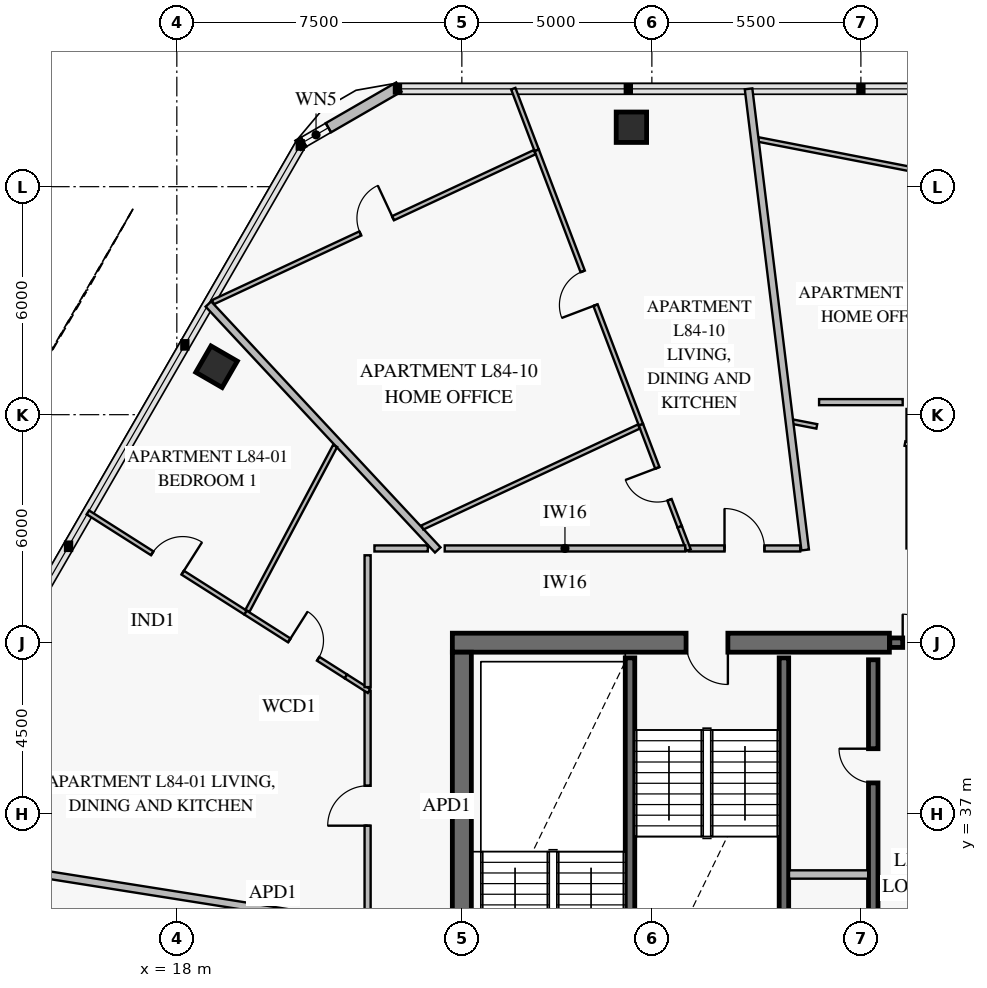
"""IFC4 building model, lengths in metres.
Left out: names, types, materials, properties, quantities, classifications, styles, units other than length and angle.
Written with IfcOpenShell. Run it as: python <this file> out.ifc"""

import sys

from ifc_helpers import new_model, si_unit, direction, frame, frame_2d, origin, origin_2d, place, context, subcontext, project, spatial, rectangle, extrude, element, fill, save


model = new_model("IFC4")
c1 = context("Model", 3, precision=1e-05, world=origin(), true_north=direction((0.0, 1.0)))
c2 = subcontext(c1, "Body", "Model", "MODEL_VIEW")
j1 = project(units=[si_unit("LENGTHUNIT", "METRE"), si_unit("PLANEANGLEUNIT", "RADIAN")], contexts=[c1])
p1 = place(None, origin())
s1 = spatial("IfcSite", under=j1, at=p1, CompositionType="ELEMENT")
p2 = place(p1, origin())
s2 = spatial("IfcBuilding", under=s1, at=p2, CompositionType="ELEMENT")
p3 = place(p2, frame((0.0, 0.0, 331.0)))
s3 = spatial("IfcBuildingStorey", under=s2, at=p3, CompositionType="ELEMENT", Elevation=331.0)
p4 = place(p3, frame((36.75, 41.5, 0.0), z_axis=(0.0, 0.0, 1.0), x_axis=(-1.0, 0.0, 0.0)))
e1 = element("IfcWall", 1, at=p4, inside=s3, PredefinedType="SHEAR", context=c2, shape_type="SweptSolid", body=[
    extrude(rectangle(XDim=11.5, YDim=0.5, at=frame_2d((5.75, 0.0))), origin(), (0.0, 0.0, 1.0), 3.8),
])
p5 = place(p4, frame((4.25, 0.0, 0.0)))
e2 = element("IfcOpeningElement", 2, at=p5, cuts=e1, PredefinedType="OPENING", context=c2, shape_type="SweptSolid", body=[
    extrude(rectangle(XDim=1.1, YDim=2.15, at=frame_2d((0.55, 1.075))), frame((0.0, 0.262, 0.0), z_axis=(0.0, -1.0, 0.0), x_axis=(1.0, 0.0, 0.0)), (0.0, 0.0, 1.0), 0.524),
])
p6 = place(p3, frame((25.5, 22.75, 0.0), z_axis=(0.0, 0.0, 1.0), x_axis=(0.0, 1.0, 0.0)))
e3 = element("IfcWall", 3, at=p6, inside=s3, PredefinedType="SHEAR", context=c2, shape_type="SweptSolid", body=[
    extrude(rectangle(XDim=18.5, YDim=0.5, at=frame_2d((9.25, 0.0))), origin(), (0.0, 0.0, 1.0), 3.8),
])
p7 = place(p6, frame((9.0, 0.0, 0.0)))
e4 = element("IfcOpeningElement", 4, at=p7, cuts=e3, PredefinedType="OPENING", context=c2, shape_type="SweptSolid", body=[
    extrude(rectangle(XDim=1.1, YDim=2.15, at=frame_2d((0.55, 1.075))), frame((0.0, 0.262, 0.0), z_axis=(0.0, -1.0, 0.0), x_axis=(1.0, 0.0, 0.0)), (0.0, 0.0, 1.0), 0.524),
])
for number, where, z_axis, x_axis in (
    (5, (29.961, 55.064, 0.0), (0.0, 0.0, 1.0), (-1.0, 0.0, 0.0)),
    (6, (19.045, 48.762, 0.0), (0.0, 0.0, 1.0), (-0.5, -0.866, 0.0)),
):
    element("IfcColumn", number, at=place(p3, frame(where, z_axis=z_axis, x_axis=x_axis)), inside=s3, PredefinedType="COLUMN", context=c2, shape_type="SweptSolid", body=[
        extrude(rectangle(XDim=0.8, YDim=0.8, at=origin_2d()), origin(), (0.0, 0.0, 1.0), 3.55),
    ])
p8 = place(p3, frame((21.189, 54.589, 0.0), z_axis=(0.0, 0.0, 1.0), x_axis=(0.866023752521, 0.50000286006, 0.0)))
e7 = element("IfcWall", 7, at=p8, inside=s3, PredefinedType="SOLIDWALL", context=c2, shape_type="SweptSolid", body=[
    extrude(rectangle(XDim=3.065, YDim=0.28, at=frame_2d((1.532, 0.0))), origin(), (0.0, 0.0, 1.0), 3.55),
])
p9 = place(p8, frame((0.173, 0.0, 0.85)))
e8 = element("IfcOpeningElement", 8, at=p9, cuts=e7, PredefinedType="OPENING", context=c2, shape_type="SweptSolid", body=[
    extrude(rectangle(XDim=0.75, YDim=1.5, at=frame_2d((0.375, 0.75))), frame((0.0, 0.152, 0.0), z_axis=(0.0, -1.0, 0.0), x_axis=(1.0, 0.0, 0.0)), (0.0, 0.0, 1.0), 0.304),
])
p10 = place(p3, frame((36.76, 41.5, 0.0), z_axis=(0.0, 0.0, 1.0), x_axis=(1.0, 0.0, 0.0)))
e9 = element("IfcWall", 9, at=p10, inside=s3, PredefinedType="SOLIDWALL", context=c2, shape_type="SweptSolid", body=[
    extrude(rectangle(XDim=2.18, YDim=0.25, at=frame_2d((1.09, 0.0))), origin(), (0.0, 0.0, 1.0), 3.8),
])
p11 = place(p10, frame((0.34, 0.0, 0.0)))
e10 = element("IfcOpeningElement", 10, at=p11, cuts=e9, PredefinedType="OPENING", context=c2, shape_type="SweptSolid", body=[
    extrude(rectangle(XDim=1.5, YDim=2.15, at=frame_2d((0.75, 1.075))), frame((0.0, 0.137, 0.0), z_axis=(0.0, -1.0, 0.0), x_axis=(1.0, 0.0, 0.0)), (0.0, 0.0, 1.0), 0.274),
])
for number, where, z_axis, x_axis in (
    (11, (29.925, 31.4, 0.0), (0.0, 0.0, 1.0), (0.0, 1.0, 0.0)),
    (12, (33.975, 31.4, 0.0), (0.0, 0.0, 1.0), (0.0, 1.0, 0.0)),
):
    element("IfcWall", number, at=place(p3, frame(where, z_axis=z_axis, x_axis=x_axis)), inside=s3, PredefinedType="SOLIDWALL", context=c2, shape_type="SweptSolid", body=[
        extrude(rectangle(XDim=9.7, YDim=0.25, at=frame_2d((4.85, 0.0))), origin(), (0.0, 0.0, 1.0), 3.8),
    ])
p12 = place(p3, frame((36.325, 31.4, 0.0), z_axis=(0.0, 0.0, 1.0), x_axis=(0.0, 1.0, 0.0)))
e13 = element("IfcWall", 13, at=p12, inside=s3, PredefinedType="SOLIDWALL", context=c2, shape_type="SweptSolid", body=[
    extrude(rectangle(XDim=9.65, YDim=0.25, at=frame_2d((4.825, 0.0))), origin(), (0.0, 0.0, 1.0), 3.8),
])
p13 = place(p12, frame((1.49, 0.0, 0.0)))
e14 = element("IfcOpeningElement", 14, at=p13, cuts=e13, PredefinedType="OPENING", context=c2, shape_type="SweptSolid", body=[
    extrude(rectangle(XDim=0.9, YDim=2.1, at=frame_2d((0.45, 1.05))), frame((0.0, 0.137, 0.0), z_axis=(0.0, -1.0, 0.0), x_axis=(1.0, 0.0, 0.0)), (0.0, 0.0, 1.0), 0.274),
])
p14 = place(p12, frame((6.41, 0.0, 0.0)))
e15 = element("IfcOpeningElement", 15, at=p14, cuts=e13, PredefinedType="OPENING", context=c2, shape_type="SweptSolid", body=[
    extrude(rectangle(XDim=0.9, YDim=2.1, at=frame_2d((0.45, 1.05))), frame((0.0, 0.137, 0.0), z_axis=(0.0, -1.0, 0.0), x_axis=(1.0, 0.0, 0.0)), (0.0, 0.0, 1.0), 0.274),
])
p15 = place(p3, frame((22.45, 40.612, 0.0), z_axis=(0.0, 0.0, 1.0), x_axis=(-0.843946894376, 0.536426732624, 0.0)))
e16 = element("IfcWall", 16, at=p15, inside=s3, PredefinedType="PARTITIONING", context=c2, shape_type="SweptSolid", body=[
    extrude(rectangle(XDim=3.134, YDim=0.12, at=frame_2d((1.567, 0.0))), origin(), (0.0, 0.0, 1.0), 3.2),
])
p16 = place(p15, frame((0.866, 0.0, 0.0)))
e17 = element("IfcOpeningElement", 17, at=p16, cuts=e16, PredefinedType="OPENING", context=c2, shape_type="SweptSolid", body=[
    extrude(rectangle(XDim=0.9, YDim=2.1, at=frame_2d((0.45, 1.05))), frame((0.0, 0.072, 0.0), z_axis=(0.0, -1.0, 0.0), x_axis=(1.0, 0.0, 0.0)), (0.0, 0.0, 1.0), 0.144),
])
p17 = place(p3, frame((19.805, 42.293, 0.0), z_axis=(0.0, 0.0, 1.0), x_axis=(-0.843964252014, 0.536399423306, 0.0)))
e18 = element("IfcWall", 18, at=p17, inside=s3, PredefinedType="PARTITIONING", context=c2, shape_type="SweptSolid", body=[
    extrude(rectangle(XDim=4.912, YDim=0.12, at=frame_2d((2.456, 0.0))), origin(), (0.0, 0.0, 1.0), 2.97),
])
p18 = place(p17, frame((1.956, 0.0, 0.0)))
e19 = element("IfcOpeningElement", 19, at=p18, cuts=e18, PredefinedType="OPENING", context=c2, shape_type="SweptSolid", body=[
    extrude(rectangle(XDim=0.95, YDim=2.1, at=frame_2d((0.475, 1.05))), frame((0.0, 0.072, 0.0), z_axis=(0.0, -1.0, 0.0), x_axis=(1.0, 0.0, 0.0)), (0.0, 0.0, 1.0), 0.144),
])
p19 = place(p3, frame((23.02, 40.226, 0.0), z_axis=(0.0, 0.0, 1.0), x_axis=(0.0, -1.0, 0.0)))
e20 = element("IfcWall", 20, at=p19, inside=s3, PredefinedType="PARTITIONING", context=c2, shape_type="SweptSolid", body=[
    extrude(rectangle(XDim=6.034, YDim=0.16, at=frame_2d((3.017, 0.0))), origin(), (0.0, 0.0, 1.0), 3.0),
])
p20 = place(p19, frame((2.492, 0.0, 0.0)))
e21 = element("IfcOpeningElement", 21, at=p20, cuts=e20, PredefinedType="OPENING", context=c2, shape_type="SweptSolid", body=[
    extrude(rectangle(XDim=1.05, YDim=2.15, at=frame_2d((0.525, 1.075))), frame((0.0, 0.092, 0.0), z_axis=(0.0, -1.0, 0.0), x_axis=(1.0, 0.0, 0.0)), (0.0, 0.0, 1.0), 0.184),
])
p21 = place(p3, frame((41.667, 53.115, 0.0), z_axis=(0.0, 0.0, 1.0), x_axis=(-0.981630458745, 0.190792144662, 0.0)))
e22 = element("IfcWall", 22, at=p21, inside=s3, PredefinedType="PARTITIONING", context=c2, shape_type="SweptSolid", body=[
    extrude(rectangle(XDim=8.515, YDim=0.12, at=frame_2d((4.257, 0.0))), origin(), (0.0, 0.0, 1.0), 3.0),
])
p22 = place(p21, frame((2.598, 0.0, 0.0)))
e23 = element("IfcOpeningElement", 23, at=p22, cuts=e22, PredefinedType="OPENING", context=c2, shape_type="SweptSolid", body=[
    extrude(rectangle(XDim=0.95, YDim=2.1, at=frame_2d((0.475, 1.05))), frame((0.0, 0.072, 0.0), z_axis=(0.0, -1.0, 0.0), x_axis=(1.0, 0.0, 0.0)), (0.0, 0.0, 1.0), 0.144),
])
p23 = place(p3, frame((31.233, 44.55, 0.0), z_axis=(0.0, 0.0, 1.0), x_axis=(-0.355127317652, 0.934817943911, 0.0)))
e24 = element("IfcWall", 24, at=p23, inside=s3, PredefinedType="PARTITIONING", context=c2, shape_type="SweptSolid", body=[
    extrude(rectangle(XDim=2.878, YDim=0.12, at=frame_2d((1.439, 0.0))), origin(), (0.0, 0.0, 1.0), 3.55),
])
p24 = place(p23, frame((0.759, 0.0, 0.0)))
e25 = element("IfcOpeningElement", 25, at=p24, cuts=e24, PredefinedType="OPENING", context=c2, shape_type="SweptSolid", body=[
    extrude(rectangle(XDim=0.9, YDim=2.1, at=frame_2d((0.45, 1.05))), frame((0.0, 0.072, 0.0), z_axis=(0.0, -1.0, 0.0), x_axis=(1.0, 0.0, 0.0)), (0.0, 0.0, 1.0), 0.144),
])
p25 = place(p3, frame((30.211, 47.24, 0.0), z_axis=(0.0, 0.0, 1.0), x_axis=(-0.355107814632, 0.934825352666, 0.0)))
e26 = element("IfcWall", 26, at=p25, inside=s3, PredefinedType="PARTITIONING", context=c2, shape_type="SweptSolid", body=[
    extrude(rectangle(XDim=7.723, YDim=0.12, at=frame_2d((3.861, 0.0))), origin(), (0.0, 0.0, 1.0), 2.97),
])
p26 = place(p25, frame((3.361, 0.0, 0.0)))
e27 = element("IfcOpeningElement", 27, at=p26, cuts=e26, PredefinedType="OPENING", context=c2, shape_type="SweptSolid", body=[
    extrude(rectangle(XDim=0.95, YDim=2.1, at=frame_2d((0.475, 1.05))), frame((0.0, 0.072, 0.0), z_axis=(0.0, -1.0, 0.0), x_axis=(1.0, 0.0, 0.0)), (0.0, 0.0, 1.0), 0.144),
])
p27 = place(p3, frame((27.415, 54.408, 0.0), z_axis=(0.0, 0.0, 1.0), x_axis=(-0.906299284586, -0.422636494825, 0.0)))
e28 = element("IfcWall", 28, at=p27, inside=s3, PredefinedType="PARTITIONING", context=c2, shape_type="SweptSolid", body=[
    extrude(rectangle(XDim=9.341, YDim=0.12, at=frame_2d((4.671, 0.0))), origin(), (0.0, 0.0, 1.0), 3.55),
])
p28 = place(p27, frame((4.112, 0.0, 0.0)))
e29 = element("IfcOpeningElement", 29, at=p28, cuts=e28, PredefinedType="OPENING", context=c2, shape_type="SweptSolid", body=[
    extrude(rectangle(XDim=0.95, YDim=2.1, at=frame_2d((0.475, 1.05))), frame((0.0, 0.072, 0.0), z_axis=(0.0, -1.0, 0.0), x_axis=(1.0, 0.0, 0.0)), (0.0, 0.0, 1.0), 0.144),
])
p29 = place(p3, frame((34.403, 43.98, 0.0), z_axis=(0.0, 0.0, 1.0), x_axis=(-1.0, 0.0, 0.0)))
e30 = element("IfcWall", 30, at=p29, inside=s3, PredefinedType="PARTITIONING", context=c2, shape_type="SweptSolid", body=[
    extrude(rectangle(XDim=2.932, YDim=0.16, at=frame_2d((1.466, 0.0))), origin(), (0.0, 0.0, 1.0), 3.0),
])
p30 = place(p29, frame((0.941, 0.0, 0.0)))
e31 = element("IfcOpeningElement", 31, at=p30, cuts=e30, PredefinedType="OPENING", context=c2, shape_type="SweptSolid", body=[
    extrude(rectangle(XDim=1.05, YDim=2.15, at=frame_2d((0.525, 1.075))), frame((0.0, 0.092, 0.0), z_axis=(0.0, -1.0, 0.0), x_axis=(1.0, 0.0, 0.0)), (0.0, 0.0, 1.0), 0.184),
])
p31 = place(p3, frame((34.108, 35.4, 0.0), z_axis=(0.0, 0.0, 1.0), x_axis=(1.0, 0.0, 0.0)))
e32 = element("IfcWall", 32, at=p31, inside=s3, PredefinedType="PARTITIONING", context=c2, shape_type="SweptSolid", body=[
    extrude(rectangle(XDim=2.084, YDim=0.22, at=frame_2d((1.042, 0.0))), origin(), (0.0, 0.0, 1.0), 3.55),
])
p32 = place(p3, frame((24.866, 43.94, 0.0), z_axis=(0.0, 0.0, 1.0), x_axis=(-0.68199474611, 0.731357071667, 0.0)))
e33 = element("IfcWall", 33, at=p32, inside=s3, PredefinedType="PARTITIONING", context=c2, shape_type="SweptSolid", body=[
    extrude(rectangle(XDim=8.848, YDim=0.2, at=frame_2d((4.424, 0.0))), origin(), (0.0, 0.0, 1.0), 2.97),
])
p33 = place(p3, frame((23.057, 40.226, 0.0), z_axis=(0.0, 0.0, 1.0), x_axis=(-0.844010519213, 0.536326620127, 0.0)))
e34 = element("IfcWall", 34, at=p33, inside=s3, PredefinedType="PARTITIONING", context=c2, shape_type="SweptSolid", body=[
    extrude(rectangle(XDim=0.72, YDim=0.12, at=frame_2d((0.36, 0.0))), origin(), (0.0, 0.0, 1.0), 3.55),
])
p34 = place(p3, frame((22.165, 46.678, 0.0), z_axis=(0.0, 0.0, 1.0), x_axis=(-0.469514895951, -0.882924550842, 0.0)))
e35 = element("IfcWall", 35, at=p34, inside=s3, PredefinedType="PARTITIONING", context=c2, shape_type="SweptSolid", body=[
    extrude(rectangle(XDim=4.913, YDim=0.12, at=frame_2d((2.457, 0.0))), origin(), (0.0, 0.0, 1.0), 3.0),
])
p35 = place(p3, frame((23.06, 34.05, 0.0), z_axis=(0.0, 0.0, 1.0), x_axis=(-0.987689201377, 0.156429030179, 0.0)))
e36 = element("IfcWall", 36, at=p35, inside=s3, PredefinedType="PARTITIONING", context=c2, shape_type="SweptSolid", body=[
    extrude(rectangle(XDim=12.686, YDim=0.2, at=frame_2d((6.343, 0.0))), origin(), (0.0, 0.0, 1.0), 2.97),
])
p36 = place(p3, frame((39.795, 46.229, 0.0), z_axis=(0.0, 0.0, 1.0), x_axis=(-0.981632896255, 0.190779603181, 0.0)))
e37 = element("IfcWall", 37, at=p36, inside=s3, PredefinedType="PARTITIONING", context=c2, shape_type="SweptSolid", body=[
    extrude(rectangle(XDim=2.685, YDim=0.12, at=frame_2d((1.342, 0.0))), origin(), (0.0, 0.0, 1.0), 3.0),
])
p37 = place(p3, frame((34.84, 47.192, 0.0), z_axis=(0.0, 0.0, 1.0), x_axis=(-0.981613573496, 0.190878999183, 0.0)))
e38 = element("IfcWall", 38, at=p37, inside=s3, PredefinedType="PARTITIONING", context=c2, shape_type="SweptSolid", body=[
    extrude(rectangle(XDim=0.7, YDim=0.12, at=frame_2d((0.35, 0.0))), origin(), (0.0, 0.0, 1.0), 3.55),
])
p38 = place(p3, frame((34.534, 43.94, 0.0), z_axis=(0.0, 0.0, 1.0), x_axis=(-0.121856786941, 0.992547693301, 0.0)))
e39 = element("IfcWall", 39, at=p38, inside=s3, PredefinedType="PARTITIONING", context=c2, shape_type="SweptSolid", body=[
    extrude(rectangle(XDim=12.225, YDim=0.2, at=frame_2d((6.113, 0.0))), origin(), (0.0, 0.0, 1.0), 2.97),
])
p39 = place(p3, frame((31.466, 43.937, 0.0), z_axis=(0.0, 0.0, 1.0), x_axis=(-0.355237262968, 0.934776169465, 0.0)))
e40 = element("IfcWall", 40, at=p39, inside=s3, PredefinedType="PARTITIONING", context=c2, shape_type="SweptSolid", body=[
    extrude(rectangle(XDim=0.656, YDim=0.12, at=frame_2d((0.328, 0.0))), origin(), (0.0, 0.0, 1.0), 3.55),
])
p40 = place(p3, frame((27.468, 54.46, 0.0), z_axis=(0.0, 0.0, 1.0), x_axis=(-0.35502809258, 0.934855632426, 0.0)))
e41 = element("IfcWall", 41, at=p40, inside=s3, PredefinedType="PARTITIONING", context=c2, shape_type="SweptSolid", body=[
    extrude(rectangle(XDim=1.732, YDim=0.12, at=frame_2d((0.866, 0.0))), origin(), (0.0, 0.0, 1.0), 3.55),
])
p41 = place(p3, frame((30.158, 47.188, 0.0), z_axis=(0.0, 0.0, 1.0), x_axis=(-0.906327969047, -0.422574978582, 0.0)))
e42 = element("IfcWall", 42, at=p41, inside=s3, PredefinedType="PARTITIONING", context=c2, shape_type="SweptSolid", body=[
    extrude(rectangle(XDim=6.285, YDim=0.12, at=frame_2d((3.143, 0.0))), origin(), (0.0, 0.0, 1.0), 3.55),
])
p42 = place(p3, frame((23.02, 43.8, 0.0), z_axis=(0.0, 0.0, 1.0), x_axis=(0.0, -1.0, 0.0)))
e43 = element("IfcWall", 43, at=p42, inside=s3, PredefinedType="PARTITIONING", context=c2, shape_type="SweptSolid", body=[
    extrude(rectangle(XDim=3.469, YDim=0.16, at=frame_2d((1.735, 0.0))), origin(), (0.0, 0.0, 1.0), 3.55),
])
p43 = place(p3, frame((24.604, 43.98, 0.0), z_axis=(0.0, 0.0, 1.0), x_axis=(-1.0, 0.0, 0.0)))
e44 = element("IfcWall", 44, at=p43, inside=s3, PredefinedType="PARTITIONING", context=c2, shape_type="SweptSolid", body=[
    extrude(rectangle(XDim=1.404, YDim=0.16, at=frame_2d((0.702, 0.0))), origin(), (0.0, 0.0, 1.0), 3.0),
])
p44 = place(p3, frame((37.1, 47.83, 0.0), z_axis=(0.0, 0.0, 1.0), x_axis=(-1.0, 0.0, 0.0)))
e45 = element("IfcWall", 45, at=p44, inside=s3, PredefinedType="PARTITIONING", context=c2, shape_type="SweptSolid", body=[
    extrude(rectangle(XDim=2.2, YDim=0.16, at=frame_2d((1.1, 0.0))), origin(), (0.0, 0.0, 1.0), 3.55),
])
p45 = place(p3, frame((31.376, 43.98, 0.0), z_axis=(0.0, 0.0, 1.0), x_axis=(-1.0, 0.0, 0.0)))
e46 = element("IfcWall", 46, at=p45, inside=s3, PredefinedType="PARTITIONING", context=c2, shape_type="SweptSolid", body=[
    extrude(rectangle(XDim=6.327, YDim=0.16, at=frame_2d((3.164, 0.0))), origin(), (0.0, 0.0, 1.0), 3.55),
])
p46 = place(p9, origin())
e47 = element("IfcWindow", 47, at=p46, inside=s3, PartitioningType="SINGLE_PANEL", PredefinedType="WINDOW", context=c2, shape_type="SweptSolid", body=[
    extrude(rectangle(XDim=0.75, YDim=1.5, at=frame_2d((0.375, 0.75))), frame((0.0, 0.03, 0.0), z_axis=(0.0, -1.0, 0.0), x_axis=(1.0, 0.0, 0.0)), (0.0, 0.0, 1.0), 0.06),
])
fill(e8, e47)
p47 = place(p5, origin())
e48 = element("IfcDoor", 48, at=p47, inside=s3, OperationType="SINGLE_SWING_LEFT", PredefinedType="USERDEFINED", context=c2, shape_type="SweptSolid", body=[
    extrude(rectangle(XDim=1.1, YDim=2.15, at=frame_2d((0.55, 1.075))), frame((0.0, 0.025, 0.0), z_axis=(0.0, -1.0, 0.0), x_axis=(1.0, 0.0, 0.0)), (0.0, 0.0, 1.0), 0.05),
])
fill(e2, e48)
p48 = place(p11, origin())
e49 = element("IfcDoor", 49, at=p48, inside=s3, OperationType="DOUBLE_DOOR_SINGLE_SWING", PredefinedType="DOOR", context=c2, shape_type="SweptSolid", body=[
    extrude(rectangle(XDim=1.5, YDim=2.15, at=frame_2d((0.75, 1.075))), frame((0.0, 0.025, 0.0), z_axis=(0.0, -1.0, 0.0), x_axis=(1.0, 0.0, 0.0)), (0.0, 0.0, 1.0), 0.05),
])
fill(e10, e49)
p49 = place(p14, origin())
e50 = element("IfcDoor", 50, at=p49, inside=s3, OperationType="SINGLE_SWING_RIGHT", PredefinedType="DOOR", context=c2, shape_type="SweptSolid", body=[
    extrude(rectangle(XDim=0.9, YDim=2.1, at=frame_2d((0.45, 1.05))), frame((0.0, 0.025, 0.0), z_axis=(0.0, -1.0, 0.0), x_axis=(1.0, 0.0, 0.0)), (0.0, 0.0, 1.0), 0.05),
])
fill(e15, e50)
p50 = place(p16, frame((0.9, 0.0, 0.0), z_axis=(0.0, 0.0, 1.0), x_axis=(-1.0, 0.0, 0.0)))
e51 = element("IfcDoor", 51, at=p50, inside=s3, OperationType="SINGLE_SWING_LEFT", PredefinedType="DOOR", context=c2, shape_type="SweptSolid", body=[
    extrude(rectangle(XDim=0.9, YDim=2.1, at=frame_2d((0.45, 1.05))), frame((0.0, 0.025, 0.0), z_axis=(0.0, -1.0, 0.0), x_axis=(1.0, 0.0, 0.0)), (0.0, 0.0, 1.0), 0.05),
])
fill(e17, e51)
p51 = place(p18, frame((0.95, 0.0, 0.0), z_axis=(0.0, 0.0, 1.0), x_axis=(-1.0, 0.0, 0.0)))
e52 = element("IfcDoor", 52, at=p51, inside=s3, OperationType="SINGLE_SWING_RIGHT", PredefinedType="DOOR", context=c2, shape_type="SweptSolid", body=[
    extrude(rectangle(XDim=0.95, YDim=2.1, at=frame_2d((0.475, 1.05))), frame((0.0, 0.025, 0.0), z_axis=(0.0, -1.0, 0.0), x_axis=(1.0, 0.0, 0.0)), (0.0, 0.0, 1.0), 0.05),
])
fill(e19, e52)
p52 = place(p20, frame((1.05, 0.0, 0.0), z_axis=(0.0, 0.0, 1.0), x_axis=(-1.0, 0.0, 0.0)))
e53 = element("IfcDoor", 53, at=p52, inside=s3, OperationType="SINGLE_SWING_LEFT", PredefinedType="DOOR", context=c2, shape_type="SweptSolid", body=[
    extrude(rectangle(XDim=1.05, YDim=2.15, at=frame_2d((0.525, 1.075))), frame((0.0, 0.025, 0.0), z_axis=(0.0, -1.0, 0.0), x_axis=(1.0, 0.0, 0.0)), (0.0, 0.0, 1.0), 0.05),
])
fill(e21, e53)
p53 = place(p24, origin())
e54 = element("IfcDoor", 54, at=p53, inside=s3, OperationType="SINGLE_SWING_RIGHT", PredefinedType="DOOR", context=c2, shape_type="SweptSolid", body=[
    extrude(rectangle(XDim=0.9, YDim=2.1, at=frame_2d((0.45, 1.05))), frame((0.0, 0.025, 0.0), z_axis=(0.0, -1.0, 0.0), x_axis=(1.0, 0.0, 0.0)), (0.0, 0.0, 1.0), 0.05),
])
fill(e25, e54)
p54 = place(p26, origin())
e55 = element("IfcDoor", 55, at=p54, inside=s3, OperationType="SINGLE_SWING_LEFT", PredefinedType="DOOR", context=c2, shape_type="SweptSolid", body=[
    extrude(rectangle(XDim=0.95, YDim=2.1, at=frame_2d((0.475, 1.05))), frame((0.0, 0.025, 0.0), z_axis=(0.0, -1.0, 0.0), x_axis=(1.0, 0.0, 0.0)), (0.0, 0.0, 1.0), 0.05),
])
fill(e27, e55)
p55 = place(p28, frame((0.95, 0.0, 0.0), z_axis=(0.0, 0.0, 1.0), x_axis=(-1.0, 0.0, 0.0)))
e56 = element("IfcDoor", 56, at=p55, inside=s3, OperationType="SINGLE_SWING_RIGHT", PredefinedType="DOOR", context=c2, shape_type="SweptSolid", body=[
    extrude(rectangle(XDim=0.95, YDim=2.1, at=frame_2d((0.475, 1.05))), frame((0.0, 0.025, 0.0), z_axis=(0.0, -1.0, 0.0), x_axis=(1.0, 0.0, 0.0)), (0.0, 0.0, 1.0), 0.05),
])
fill(e29, e56)
p56 = place(p30, frame((1.05, 0.0, 0.0), z_axis=(0.0, 0.0, 1.0), x_axis=(-1.0, 0.0, 0.0)))
e57 = element("IfcDoor", 57, at=p56, inside=s3, OperationType="SINGLE_SWING_LEFT", PredefinedType="DOOR", context=c2, shape_type="SweptSolid", body=[
    extrude(rectangle(XDim=1.05, YDim=2.15, at=frame_2d((0.525, 1.075))), frame((0.0, 0.025, 0.0), z_axis=(0.0, -1.0, 0.0), x_axis=(1.0, 0.0, 0.0)), (0.0, 0.0, 1.0), 0.05),
])
fill(e31, e57)
save(model, sys.argv[1])
